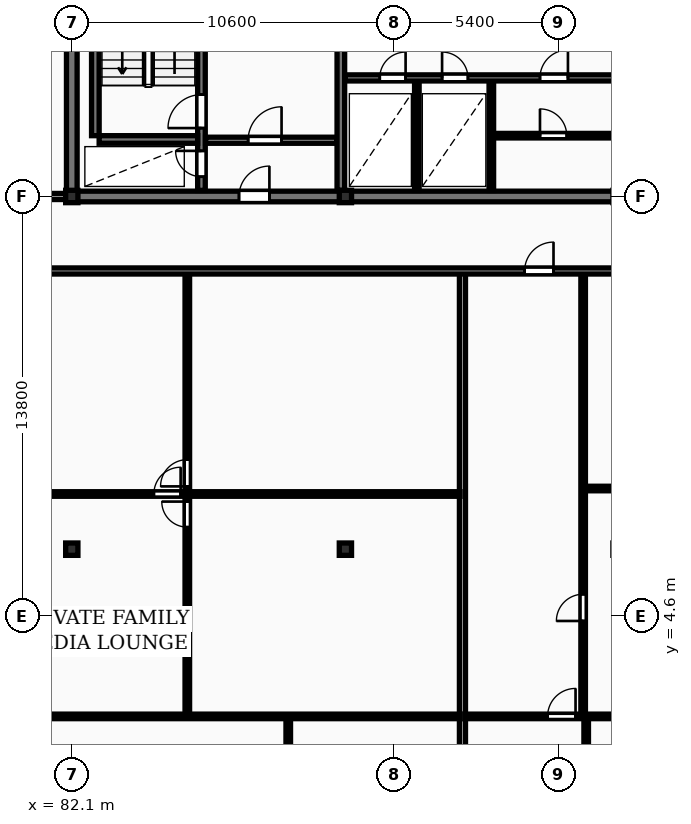
"""IFC4 building model, lengths in metres.
Left out: names, types, materials, properties, quantities, classifications, styles, units other than length and angle.
Written with IfcOpenShell. Run it as: python <this file> out.ifc"""

import sys

from ifc_helpers import new_model, si_unit, direction, frame, frame_2d, origin, origin_2d, place, context, subcontext, project, spatial, rectangle, i_section, extrude, element, fill, save


model = new_model("IFC4")
c1 = context("Model", 3, precision=1e-05, world=origin(), true_north=direction((0.0, 1.0)))
c2 = subcontext(c1, "Body", "Model", "MODEL_VIEW")
j1 = project(units=[si_unit("LENGTHUNIT", "METRE"), si_unit("PLANEANGLEUNIT", "RADIAN")], contexts=[c1])
p1 = place(None, origin())
s1 = spatial("IfcSite", under=j1, at=p1, CompositionType="ELEMENT")
p2 = place(p1, origin())
s2 = spatial("IfcBuilding", under=s1, at=p2, CompositionType="ELEMENT")
p3 = place(p2, frame((0.0, 0.0, 139.3)))
s3 = spatial("IfcBuildingStorey", under=s2, at=p3, CompositionType="ELEMENT", Elevation=139.3)
for number, where, z_axis, x_axis in (
    (1, (82.1, 6.8, 0.0), (0.0, 0.0, 1.0), (1.0, 0.0, 0.0)),
    (2, (82.1, 18.4, 0.0), (0.0, 0.0, 1.0), (1.0, 0.0, 0.0)),
    (3, (91.1, 6.8, 0.0), (0.0, 0.0, 1.0), (1.0, 0.0, 0.0)),
    (4, (91.1, 18.4, 0.0), (0.0, 0.0, 1.0), (1.0, 0.0, 0.0)),
):
    element("IfcColumn", number, at=place(p3, frame(where, z_axis=z_axis, x_axis=x_axis)), inside=s3, PredefinedType="COLUMN", context=c2, shape_type="SweptSolid", body=[
        extrude(i_section(OverallWidth=0.403, OverallDepth=0.406, WebThickness=0.027, FlangeThickness=0.043, FilletRadius=0.015, at=origin_2d()), origin(), (0.0, 0.0, 1.0), 3.6),
    ])
p4 = place(p3, frame((82.1, 18.575, 0.0), z_axis=(0.0, 0.0, 1.0), x_axis=(0.0, 1.0, 0.0)))
e5 = element("IfcWall", 5, at=p4, inside=s3, PredefinedType="SHEAR", context=c2, shape_type="SweptSolid", body=[
    extrude(rectangle(XDim=11.65, YDim=0.35, at=frame_2d((5.825, 0.0))), origin(), (0.0, 0.0, 1.0), 3.6),
])
p5 = place(p3, frame((81.925, 18.4, 0.0), z_axis=(0.0, 0.0, 1.0), x_axis=(1.0, 0.0, 0.0)))
e6 = element("IfcWall", 6, at=p5, inside=s3, PredefinedType="SHEAR", context=c2, shape_type="SweptSolid", body=[
    extrude(rectangle(XDim=36.265, YDim=0.35, at=frame_2d((18.132, 0.0))), origin(), (0.0, 0.0, 1.0), 3.6),
])
p6 = place(p5, frame((5.675, 0.0, 0.0)))
e7 = element("IfcOpeningElement", 7, at=p6, cuts=e6, PredefinedType="OPENING", context=c2, shape_type="SweptSolid", body=[
    extrude(rectangle(XDim=1.0, YDim=2.15, at=frame_2d((0.5, 1.075))), frame((0.0, 0.185, 0.0), z_axis=(0.0, -1.0, 0.0), x_axis=(1.0, 0.0, 0.0)), (0.0, 0.0, 1.0), 0.37),
])
p7 = place(p5, frame((21.925, 0.0, 0.0)))
e8 = element("IfcOpeningElement", 8, at=p7, cuts=e6, PredefinedType="OPENING", context=c2, shape_type="SweptSolid", body=[
    extrude(rectangle(XDim=1.5, YDim=2.2, at=frame_2d((0.75, 1.1))), frame((0.0, 0.185, 0.0), z_axis=(0.0, -1.0, 0.0), x_axis=(1.0, 0.0, 0.0)), (0.0, 0.0, 1.0), 0.37),
])
p8 = place(p5, frame((29.875, 0.0, 0.0)))
e9 = element("IfcOpeningElement", 9, at=p8, cuts=e6, PredefinedType="OPENING", context=c2, shape_type="SweptSolid", body=[
    extrude(rectangle(XDim=1.0, YDim=2.15, at=frame_2d((0.5, 1.075))), frame((0.0, 0.185, 0.0), z_axis=(0.0, -1.0, 0.0), x_axis=(1.0, 0.0, 0.0)), (0.0, 0.0, 1.0), 0.37),
])
p9 = place(p3, frame((82.875, 20.4, 0.0), z_axis=(0.0, 0.0, 1.0), x_axis=(0.0, 1.0, 0.0)))
e10 = element("IfcWall", 10, at=p9, inside=s3, PredefinedType="SHEAR", context=c2, shape_type="SweptSolid", body=[
    extrude(rectangle(XDim=7.6, YDim=0.25, at=frame_2d((3.8, 0.0))), origin(), (0.0, 0.0, 1.0), 3.6),
])
p10 = place(p3, frame((86.365, 18.6, 0.0), z_axis=(0.0, 0.0, 1.0), x_axis=(0.0, 1.0, 0.0)))
e11 = element("IfcWall", 11, at=p10, inside=s3, PredefinedType="SHEAR", context=c2, shape_type="SweptSolid", body=[
    extrude(rectangle(XDim=11.6, YDim=0.25, at=frame_2d((5.8, 0.0))), origin(), (0.0, 0.0, 1.0), 3.6),
])
p11 = place(p10, frame((0.45, 0.0, 0.0)))
e12 = element("IfcOpeningElement", 12, at=p11, cuts=e11, PredefinedType="OPENING", context=c2, shape_type="SweptSolid", body=[
    extrude(rectangle(XDim=0.85, YDim=2.05, at=frame_2d((0.425, 1.025))), frame((0.0, 0.135, 0.0), z_axis=(0.0, -1.0, 0.0), x_axis=(1.0, 0.0, 0.0)), (0.0, 0.0, 1.0), 0.27),
])
p12 = place(p10, frame((2.05, 0.0, 0.0)))
e13 = element("IfcOpeningElement", 13, at=p12, cuts=e11, PredefinedType="OPENING", context=c2, shape_type="SweptSolid", body=[
    extrude(rectangle(XDim=1.1, YDim=2.1, at=frame_2d((0.55, 1.05))), frame((0.0, 0.135, 0.0), z_axis=(0.0, -1.0, 0.0), x_axis=(1.0, 0.0, 0.0)), (0.0, 0.0, 1.0), 0.27),
])
p13 = place(p10, frame((9.95, 0.0, 0.0)))
e14 = element("IfcOpeningElement", 14, at=p13, cuts=e11, PredefinedType="OPENING", context=c2, shape_type="SweptSolid", body=[
    extrude(rectangle(XDim=0.85, YDim=2.05, at=frame_2d((0.425, 1.025))), frame((0.0, 0.135, 0.0), z_axis=(0.0, -1.0, 0.0), x_axis=(1.0, 0.0, 0.0)), (0.0, 0.0, 1.0), 0.27),
])
p14 = place(p3, frame((83.0, 20.275, 0.0), z_axis=(0.0, 0.0, 1.0), x_axis=(1.0, 0.0, 0.0)))
e15 = element("IfcWall", 15, at=p14, inside=s3, PredefinedType="SHEAR", context=c2, shape_type="SweptSolid", body=[
    extrude(rectangle(XDim=3.24, YDim=0.25, at=frame_2d((1.62, 0.0))), origin(), (0.0, 0.0, 1.0), 3.6),
])
p15 = place(p3, frame((86.5, 20.25, 0.0), z_axis=(0.0, 0.0, 1.0), x_axis=(1.0, 0.0, 0.0)))
e16 = element("IfcWall", 16, at=p15, inside=s3, PredefinedType="PARTITIONING", context=c2, shape_type="SweptSolid", body=[
    extrude(rectangle(XDim=4.32, YDim=0.2, at=frame_2d((2.16, 0.0))), origin(), (0.0, 0.0, 1.0), 3.31),
])
p16 = place(p15, frame((1.4, 0.0, 0.0)))
e17 = element("IfcOpeningElement", 17, at=p16, cuts=e16, PredefinedType="OPENING", context=c2, shape_type="SweptSolid", body=[
    extrude(rectangle(XDim=1.1, YDim=2.1, at=frame_2d((0.55, 1.05))), frame((0.0, 0.11, 0.0), z_axis=(0.0, -1.0, 0.0), x_axis=(1.0, 0.0, 0.0)), (0.0, 0.0, 1.0), 0.22),
])
p17 = place(p3, frame((90.95, 18.6, 0.0), z_axis=(0.0, 0.0, 1.0), x_axis=(0.0, 1.0, 0.0)))
e18 = element("IfcWall", 18, at=p17, inside=s3, PredefinedType="SHEAR", context=c2, shape_type="SweptSolid", body=[
    extrude(rectangle(XDim=11.6, YDim=0.25, at=frame_2d((5.8, 0.0))), origin(), (0.0, 0.0, 1.0), 3.6),
])
p18 = place(p17, frame((4.6, 0.0, 0.0)))
e19 = element("IfcOpeningElement", 19, at=p18, cuts=e18, PredefinedType="OPENING", context=c2, shape_type="SweptSolid", body=[
    extrude(rectangle(XDim=1.1, YDim=2.1, at=frame_2d((0.55, 1.05))), frame((0.0, 0.135, 0.0), z_axis=(0.0, -1.0, 0.0), x_axis=(1.0, 0.0, 0.0)), (0.0, 0.0, 1.0), 0.27),
])
for number, where, z_axis, x_axis in (
    (20, (93.45, 18.6, 0.0), (0.0, 0.0, 1.0), (0.0, 1.0, 0.0)),
    (21, (95.9, 18.6, 0.0), (0.0, 0.0, 1.0), (0.0, 1.0, 0.0)),
):
    element("IfcWall", number, at=place(p3, frame(where, z_axis=z_axis, x_axis=x_axis)), inside=s3, PredefinedType="PARTITIONING", context=c2, shape_type="SweptSolid", body=[
        extrude(rectangle(XDim=3.6, YDim=0.15, at=frame_2d((1.8, 0.0))), origin(), (0.0, 0.0, 1.0), 3.31),
    ])
p19 = place(p3, frame((95.9, 20.4, 0.0), z_axis=(0.0, 0.0, 1.0), x_axis=(1.0, 0.0, 0.0)))
e22 = element("IfcWall", 22, at=p19, inside=s3, PredefinedType="PARTITIONING", context=c2, shape_type="SweptSolid", body=[
    extrude(rectangle(XDim=6.7, YDim=0.15, at=frame_2d((3.35, 0.0))), origin(), (0.0, 0.0, 1.0), 3.31),
])
p20 = place(p19, frame((1.6, 0.0, 0.0)))
e23 = element("IfcOpeningElement", 23, at=p20, cuts=e22, PredefinedType="OPENING", context=c2, shape_type="SweptSolid", body=[
    extrude(rectangle(XDim=0.88, YDim=2.06, at=frame_2d((0.44, 1.03))), frame((0.0, 0.085, 0.0), z_axis=(0.0, -1.0, 0.0), x_axis=(1.0, 0.0, 0.0)), (0.0, 0.0, 1.0), 0.17),
])
p21 = place(p3, frame((91.08, 22.3, 0.0), z_axis=(0.0, 0.0, 1.0), x_axis=(1.0, 0.0, 0.0)))
e24 = element("IfcWall", 24, at=p21, inside=s3, PredefinedType="PARTITIONING", context=c2, shape_type="SweptSolid", body=[
    extrude(rectangle(XDim=19.14, YDim=0.2, at=frame_2d((9.57, 0.0))), origin(), (0.0, 0.0, 1.0), 3.31),
])
p22 = place(p21, frame((1.15, 0.0, 0.0)))
e25 = element("IfcOpeningElement", 25, at=p22, cuts=e24, PredefinedType="OPENING", context=c2, shape_type="SweptSolid", body=[
    extrude(rectangle(XDim=0.85, YDim=2.05, at=frame_2d((0.425, 1.025))), frame((0.0, 0.11, 0.0), z_axis=(0.0, -1.0, 0.0), x_axis=(1.0, 0.0, 0.0)), (0.0, 0.0, 1.0), 0.22),
])
p23 = place(p21, frame((3.2, 0.0, 0.0)))
e26 = element("IfcOpeningElement", 26, at=p23, cuts=e24, PredefinedType="OPENING", context=c2, shape_type="SweptSolid", body=[
    extrude(rectangle(XDim=0.85, YDim=2.05, at=frame_2d((0.425, 1.025))), frame((0.0, 0.11, 0.0), z_axis=(0.0, -1.0, 0.0), x_axis=(1.0, 0.0, 0.0)), (0.0, 0.0, 1.0), 0.22),
])
p24 = place(p21, frame((12.72, 0.0, 0.0)))
e27 = element("IfcOpeningElement", 27, at=p24, cuts=e24, PredefinedType="OPENING", context=c2, shape_type="SweptSolid", body=[
    extrude(rectangle(XDim=1.5, YDim=2.2, at=frame_2d((0.75, 1.1))), frame((0.0, 0.11, 0.0), z_axis=(0.0, -1.0, 0.0), x_axis=(1.0, 0.0, 0.0)), (0.0, 0.0, 1.0), 0.22),
])
p25 = place(p21, frame((6.42, 0.0, 0.0)))
e28 = element("IfcOpeningElement", 28, at=p25, cuts=e24, PredefinedType="OPENING", context=c2, shape_type="SweptSolid", body=[
    extrude(rectangle(XDim=0.92, YDim=2.08, at=frame_2d((0.46, 1.04))), frame((0.0, 0.11, 0.0), z_axis=(0.0, -1.0, 0.0), x_axis=(1.0, 0.0, 0.0)), (0.0, 0.0, 1.0), 0.22),
])
p26 = place(p21, frame((15.92, 0.0, 0.0)))
e29 = element("IfcOpeningElement", 29, at=p26, cuts=e24, PredefinedType="OPENING", context=c2, shape_type="SweptSolid", body=[
    extrude(rectangle(XDim=0.88, YDim=2.06, at=frame_2d((0.44, 1.03))), frame((0.0, 0.11, 0.0), z_axis=(0.0, -1.0, 0.0), x_axis=(1.0, 0.0, 0.0)), (0.0, 0.0, 1.0), 0.22),
])
p27 = place(p3, frame((72.7, 18.4, 0.0), z_axis=(0.0, 0.0, 1.0), x_axis=(1.0, 0.0, 0.0)))
e30 = element("IfcWall", 30, at=p27, inside=s3, PredefinedType="PARTITIONING", context=c2, shape_type="SweptSolid", body=[
    extrude(rectangle(XDim=9.25, YDim=0.2, at=frame_2d((4.625, 0.0))), origin(), (0.0, 0.0, 1.0), 2.698),
])
p28 = place(p27, frame((4.15, 0.0, 0.0)))
e31 = element("IfcOpeningElement", 31, at=p28, cuts=e30, PredefinedType="OPENING", context=c2, shape_type="SweptSolid", body=[
    extrude(rectangle(XDim=0.95, YDim=2.15, at=frame_2d((0.475, 1.075))), frame((0.0, 0.11, 0.0), z_axis=(0.0, -1.0, 0.0), x_axis=(1.0, 0.0, 0.0)), (0.0, 0.0, 1.0), 0.22),
])
p29 = place(p3, frame((94.95, -8.7, 0.0), z_axis=(0.0, 0.0, 1.0), x_axis=(0.0, 1.0, 0.0)))
e32 = element("IfcWall", 32, at=p29, inside=s3, PredefinedType="PARTITIONING", context=c2, shape_type="SweptSolid", body=[
    extrude(rectangle(XDim=24.57, YDim=0.2, at=frame_2d((12.285, 0.0))), origin(), (0.0, 0.0, 1.0), 3.31),
])
p30 = place(p3, frame((85.9, 1.34, 0.0), z_axis=(0.0, 0.0, 1.0), x_axis=(0.0, 1.0, 0.0)))
e33 = element("IfcWall", 33, at=p30, inside=s3, PredefinedType="PARTITIONING", context=c2, shape_type="SweptSolid", body=[
    extrude(rectangle(XDim=14.55, YDim=0.15, at=frame_2d((7.275, 0.0))), origin(), (0.0, 0.0, 1.0), 3.31),
])
p31 = place(p30, frame((6.185, 0.0, 0.0)))
e34 = element("IfcOpeningElement", 34, at=p31, cuts=e33, PredefinedType="OPENING", context=c2, shape_type="SweptSolid", body=[
    extrude(rectangle(XDim=0.84, YDim=2.04, at=frame_2d((0.42, 1.02))), frame((0.0, 0.085, 0.0), z_axis=(0.0, -1.0, 0.0), x_axis=(1.0, 0.0, 0.0)), (0.0, 0.0, 1.0), 0.17),
])
p32 = place(p30, frame((7.525, 0.0, 0.0)))
e35 = element("IfcOpeningElement", 35, at=p32, cuts=e33, PredefinedType="OPENING", context=c2, shape_type="SweptSolid", body=[
    extrude(rectangle(XDim=0.88, YDim=2.06, at=frame_2d((0.44, 1.03))), frame((0.0, 0.085, 0.0), z_axis=(0.0, -1.0, 0.0), x_axis=(1.0, 0.0, 0.0)), (0.0, 0.0, 1.0), 0.17),
])
p33 = place(p3, frame((76.73, 8.615, 0.0), z_axis=(0.0, 0.0, 1.0), x_axis=(1.0, 0.0, 0.0)))
e36 = element("IfcWall", 36, at=p33, inside=s3, PredefinedType="PARTITIONING", context=c2, shape_type="SweptSolid", body=[
    extrude(rectangle(XDim=18.14, YDim=0.15, at=frame_2d((9.07, 0.0))), origin(), (0.0, 0.0, 1.0), 3.31),
])
p34 = place(p33, frame((8.07, 0.0, 0.0)))
e37 = element("IfcOpeningElement", 37, at=p34, cuts=e36, PredefinedType="OPENING", context=c2, shape_type="SweptSolid", body=[
    extrude(rectangle(XDim=0.88, YDim=2.06, at=frame_2d((0.44, 1.03))), frame((0.0, 0.085, 0.0), z_axis=(0.0, -1.0, 0.0), x_axis=(1.0, 0.0, 0.0)), (0.0, 0.0, 1.0), 0.17),
])
p35 = place(p3, frame((89.22, -1.32, 0.0), z_axis=(0.0, 0.0, 1.0), x_axis=(0.0, 1.0, 0.0)))
e38 = element("IfcWall", 38, at=p35, inside=s3, PredefinedType="PARTITIONING", context=c2, shape_type="SweptSolid", body=[
    extrude(rectangle(XDim=2.58, YDim=0.15, at=frame_2d((1.29, 0.0))), origin(), (0.0, 0.0, 1.0), 3.31),
])
p36 = place(p3, frame((72.78, 1.3, 0.0), z_axis=(0.0, 0.0, 1.0), x_axis=(1.0, 0.0, 0.0)))
e39 = element("IfcWall", 39, at=p36, inside=s3, PredefinedType="PARTITIONING", context=c2, shape_type="SweptSolid", body=[
    extrude(rectangle(XDim=22.09, YDim=0.15, at=frame_2d((11.045, 0.0))), origin(), (0.0, 0.0, 1.0), 3.31),
])
p37 = place(p36, frame((2.72, 0.0, 0.0)))
e40 = element("IfcOpeningElement", 40, at=p37, cuts=e39, PredefinedType="OPENING", context=c2, shape_type="SweptSolid", body=[
    extrude(rectangle(XDim=0.92, YDim=2.08, at=frame_2d((0.46, 1.04))), frame((0.0, 0.085, 0.0), z_axis=(0.0, -1.0, 0.0), x_axis=(1.0, 0.0, 0.0)), (0.0, 0.0, 1.0), 0.17),
])
p38 = place(p3, frame((98.98, 8.795, 0.0), z_axis=(0.0, 0.0, 1.0), x_axis=(1.0, 0.0, 0.0)))
e41 = element("IfcWall", 41, at=p38, inside=s3, PredefinedType="PARTITIONING", context=c2, shape_type="SweptSolid", body=[
    extrude(rectangle(XDim=11.348, YDim=0.15, at=frame_2d((5.674, 0.0))), origin(), (0.0, 0.0, 1.0), 3.31),
])
p39 = place(p38, frame((4.372, 0.0, 0.0)))
e42 = element("IfcOpeningElement", 42, at=p39, cuts=e41, PredefinedType="OPENING", context=c2, shape_type="SweptSolid", body=[
    extrude(rectangle(XDim=0.88, YDim=2.06, at=frame_2d((0.44, 1.03))), frame((0.0, 0.085, 0.0), z_axis=(0.0, -1.0, 0.0), x_axis=(1.0, 0.0, 0.0)), (0.0, 0.0, 1.0), 0.17),
])
p40 = place(p3, frame((98.92, 1.34, 0.0), z_axis=(0.0, 0.0, 1.0), x_axis=(0.0, 1.0, 0.0)))
e43 = element("IfcWall", 43, at=p40, inside=s3, PredefinedType="PARTITIONING", context=c2, shape_type="SweptSolid", body=[
    extrude(rectangle(XDim=14.55, YDim=0.15, at=frame_2d((7.275, 0.0))), origin(), (0.0, 0.0, 1.0), 3.31),
])
p41 = place(p40, frame((3.098, 0.0, 0.0)))
e44 = element("IfcOpeningElement", 44, at=p41, cuts=e43, PredefinedType="OPENING", context=c2, shape_type="SweptSolid", body=[
    extrude(rectangle(XDim=0.88, YDim=2.06, at=frame_2d((0.44, 1.03))), frame((0.0, 0.085, 0.0), z_axis=(0.0, -1.0, 0.0), x_axis=(1.0, 0.0, 0.0)), (0.0, 0.0, 1.0), 0.17),
])
p42 = place(p3, frame((99.02, -3.74, 0.0), z_axis=(0.0, 0.0, 1.0), x_axis=(0.0, 1.0, 0.0)))
e45 = element("IfcWall", 45, at=p42, inside=s3, PredefinedType="PARTITIONING", context=c2, shape_type="SweptSolid", body=[
    extrude(rectangle(XDim=5.0, YDim=0.15, at=frame_2d((2.5, 0.0))), origin(), (0.0, 0.0, 1.0), 3.31),
])
p43 = place(p42, frame((2.06, 0.0, 0.0)))
e46 = element("IfcOpeningElement", 46, at=p43, cuts=e45, PredefinedType="OPENING", context=c2, shape_type="SweptSolid", body=[
    extrude(rectangle(XDim=0.88, YDim=2.06, at=frame_2d((0.44, 1.03))), frame((0.0, 0.085, 0.0), z_axis=(0.0, -1.0, 0.0), x_axis=(1.0, 0.0, 0.0)), (0.0, 0.0, 1.0), 0.17),
])
p44 = place(p3, frame((95.03, 1.3, 0.0), z_axis=(0.0, 0.0, 1.0), x_axis=(1.0, 0.0, 0.0)))
e47 = element("IfcWall", 47, at=p44, inside=s3, PredefinedType="PARTITIONING", context=c2, shape_type="SweptSolid", body=[
    extrude(rectangle(XDim=15.298, YDim=0.15, at=frame_2d((7.649, 0.0))), origin(), (0.0, 0.0, 1.0), 3.31),
])
p45 = place(p44, frame((2.72, 0.0, 0.0)))
e48 = element("IfcOpeningElement", 48, at=p45, cuts=e47, PredefinedType="OPENING", context=c2, shape_type="SweptSolid", body=[
    extrude(rectangle(XDim=0.92, YDim=2.08, at=frame_2d((0.46, 1.04))), frame((0.0, 0.085, 0.0), z_axis=(0.0, -1.0, 0.0), x_axis=(1.0, 0.0, 0.0)), (0.0, 0.0, 1.0), 0.17),
])
p46 = place(p3, frame((72.7, 15.95, 0.0), z_axis=(0.0, 0.0, 1.0), x_axis=(1.0, 0.0, 0.0)))
e49 = element("IfcWall", 49, at=p46, inside=s3, PredefinedType="PARTITIONING", context=c2, shape_type="SweptSolid", body=[
    extrude(rectangle(XDim=58.0, YDim=0.2, at=frame_2d((29.0, 0.0))), origin(), (0.0, 0.0, 1.0), 3.31),
])
p47 = place(p46, frame((2.045, 0.0, 0.0)))
e50 = element("IfcOpeningElement", 50, at=p47, cuts=e49, PredefinedType="OPENING", context=c2, shape_type="SweptSolid", body=[
    extrude(rectangle(XDim=0.95, YDim=2.15, at=frame_2d((0.475, 1.075))), frame((0.0, 0.11, 0.0), z_axis=(0.0, -1.0, 0.0), x_axis=(1.0, 0.0, 0.0)), (0.0, 0.0, 1.0), 0.22),
])
p48 = place(p46, frame((24.295, 0.0, 0.0)))
e51 = element("IfcOpeningElement", 51, at=p48, cuts=e49, PredefinedType="OPENING", context=c2, shape_type="SweptSolid", body=[
    extrude(rectangle(XDim=0.95, YDim=2.15, at=frame_2d((0.475, 1.075))), frame((0.0, 0.11, 0.0), z_axis=(0.0, -1.0, 0.0), x_axis=(1.0, 0.0, 0.0)), (0.0, 0.0, 1.0), 0.22),
])
p49 = place(p46, frame((39.753, 0.0, 0.0)))
e52 = element("IfcOpeningElement", 52, at=p49, cuts=e49, PredefinedType="OPENING", context=c2, shape_type="SweptSolid", body=[
    extrude(rectangle(XDim=0.95, YDim=2.15, at=frame_2d((0.475, 1.075))), frame((0.0, 0.11, 0.0), z_axis=(0.0, -1.0, 0.0), x_axis=(1.0, 0.0, 0.0)), (0.0, 0.0, 1.0), 0.22),
])
p50 = place(p6, origin())
e53 = element("IfcDoor", 53, at=p50, inside=s3, OperationType="SINGLE_SWING_RIGHT", PredefinedType="DOOR", context=c2, shape_type="SweptSolid", body=[
    extrude(rectangle(XDim=1.0, YDim=2.15, at=frame_2d((0.5, 1.075))), frame((0.0, 0.025, 0.0), z_axis=(0.0, -1.0, 0.0), x_axis=(1.0, 0.0, 0.0)), (0.0, 0.0, 1.0), 0.05),
])
fill(e7, e53)
p51 = place(p11, origin())
e54 = element("IfcDoor", 54, at=p51, inside=s3, OperationType="SINGLE_SWING_RIGHT", PredefinedType="DOOR", context=c2, shape_type="SweptSolid", body=[
    extrude(rectangle(XDim=0.85, YDim=2.05, at=frame_2d((0.425, 1.025))), frame((0.0, 0.025, 0.0), z_axis=(0.0, -1.0, 0.0), x_axis=(1.0, 0.0, 0.0)), (0.0, 0.0, 1.0), 0.05),
])
fill(e12, e54)
p52 = place(p12, origin())
e55 = element("IfcDoor", 55, at=p52, inside=s3, OperationType="SINGLE_SWING_LEFT", PredefinedType="DOOR", context=c2, shape_type="SweptSolid", body=[
    extrude(rectangle(XDim=1.1, YDim=2.1, at=frame_2d((0.55, 1.05))), frame((0.0, 0.025, 0.0), z_axis=(0.0, -1.0, 0.0), x_axis=(1.0, 0.0, 0.0)), (0.0, 0.0, 1.0), 0.05),
])
fill(e13, e55)
p53 = place(p16, origin())
e56 = element("IfcDoor", 56, at=p53, inside=s3, OperationType="SINGLE_SWING_RIGHT", PredefinedType="DOOR", context=c2, shape_type="SweptSolid", body=[
    extrude(rectangle(XDim=1.1, YDim=2.1, at=frame_2d((0.55, 1.05))), frame((0.0, 0.025, 0.0), z_axis=(0.0, -1.0, 0.0), x_axis=(1.0, 0.0, 0.0)), (0.0, 0.0, 1.0), 0.05),
])
fill(e17, e56)
p54 = place(p20, origin())
e57 = element("IfcDoor", 57, at=p54, inside=s3, OperationType="SINGLE_SWING_LEFT", PredefinedType="DOOR", context=c2, shape_type="SweptSolid", body=[
    extrude(rectangle(XDim=0.88, YDim=2.06, at=frame_2d((0.44, 1.03))), frame((0.0, 0.025, 0.0), z_axis=(0.0, -1.0, 0.0), x_axis=(1.0, 0.0, 0.0)), (0.0, 0.0, 1.0), 0.05),
])
fill(e23, e57)
p55 = place(p22, origin())
e58 = element("IfcDoor", 58, at=p55, inside=s3, OperationType="SINGLE_SWING_RIGHT", PredefinedType="DOOR", context=c2, shape_type="SweptSolid", body=[
    extrude(rectangle(XDim=0.85, YDim=2.05, at=frame_2d((0.425, 1.025))), frame((0.0, 0.025, 0.0), z_axis=(0.0, -1.0, 0.0), x_axis=(1.0, 0.0, 0.0)), (0.0, 0.0, 1.0), 0.05),
])
fill(e25, e58)
p56 = place(p23, origin())
e59 = element("IfcDoor", 59, at=p56, inside=s3, OperationType="SINGLE_SWING_LEFT", PredefinedType="DOOR", context=c2, shape_type="SweptSolid", body=[
    extrude(rectangle(XDim=0.85, YDim=2.05, at=frame_2d((0.425, 1.025))), frame((0.0, 0.025, 0.0), z_axis=(0.0, -1.0, 0.0), x_axis=(1.0, 0.0, 0.0)), (0.0, 0.0, 1.0), 0.05),
])
fill(e26, e59)
p57 = place(p25, origin())
e60 = element("IfcDoor", 60, at=p57, inside=s3, OperationType="SINGLE_SWING_RIGHT", PredefinedType="DOOR", context=c2, shape_type="SweptSolid", body=[
    extrude(rectangle(XDim=0.92, YDim=2.08, at=frame_2d((0.46, 1.04))), frame((0.0, 0.025, 0.0), z_axis=(0.0, -1.0, 0.0), x_axis=(1.0, 0.0, 0.0)), (0.0, 0.0, 1.0), 0.05),
])
fill(e28, e60)
p58 = place(p31, origin())
e61 = element("IfcDoor", 61, at=p58, inside=s3, OperationType="SINGLE_SWING_RIGHT", PredefinedType="DOOR", context=c2, shape_type="SweptSolid", body=[
    extrude(rectangle(XDim=0.84, YDim=2.04, at=frame_2d((0.42, 1.02))), frame((0.0, 0.025, 0.0), z_axis=(0.0, -1.0, 0.0), x_axis=(1.0, 0.0, 0.0)), (0.0, 0.0, 1.0), 0.05),
])
fill(e34, e61)
p59 = place(p32, origin())
e62 = element("IfcDoor", 62, at=p59, inside=s3, OperationType="SINGLE_SWING_LEFT", PredefinedType="DOOR", context=c2, shape_type="SweptSolid", body=[
    extrude(rectangle(XDim=0.88, YDim=2.06, at=frame_2d((0.44, 1.03))), frame((0.0, 0.025, 0.0), z_axis=(0.0, -1.0, 0.0), x_axis=(1.0, 0.0, 0.0)), (0.0, 0.0, 1.0), 0.05),
])
fill(e35, e62)
p60 = place(p34, origin())
e63 = element("IfcDoor", 63, at=p60, inside=s3, OperationType="SINGLE_SWING_RIGHT", PredefinedType="DOOR", context=c2, shape_type="SweptSolid", body=[
    extrude(rectangle(XDim=0.88, YDim=2.06, at=frame_2d((0.44, 1.03))), frame((0.0, 0.025, 0.0), z_axis=(0.0, -1.0, 0.0), x_axis=(1.0, 0.0, 0.0)), (0.0, 0.0, 1.0), 0.05),
])
fill(e37, e63)
p61 = place(p41, origin())
e64 = element("IfcDoor", 64, at=p61, inside=s3, OperationType="SINGLE_SWING_LEFT", PredefinedType="DOOR", context=c2, shape_type="SweptSolid", body=[
    extrude(rectangle(XDim=0.88, YDim=2.06, at=frame_2d((0.44, 1.03))), frame((0.0, 0.025, 0.0), z_axis=(0.0, -1.0, 0.0), x_axis=(1.0, 0.0, 0.0)), (0.0, 0.0, 1.0), 0.05),
])
fill(e44, e64)
p62 = place(p45, origin())
e65 = element("IfcDoor", 65, at=p62, inside=s3, OperationType="SINGLE_SWING_RIGHT", PredefinedType="DOOR", context=c2, shape_type="SweptSolid", body=[
    extrude(rectangle(XDim=0.92, YDim=2.08, at=frame_2d((0.46, 1.04))), frame((0.0, 0.025, 0.0), z_axis=(0.0, -1.0, 0.0), x_axis=(1.0, 0.0, 0.0)), (0.0, 0.0, 1.0), 0.05),
])
fill(e48, e65)
p63 = place(p48, origin())
e66 = element("IfcDoor", 66, at=p63, inside=s3, OperationType="SINGLE_SWING_RIGHT", PredefinedType="DOOR", context=c2, shape_type="SweptSolid", body=[
    extrude(rectangle(XDim=0.95, YDim=2.15, at=frame_2d((0.475, 1.075))), frame((0.0, 0.025, 0.0), z_axis=(0.0, -1.0, 0.0), x_axis=(1.0, 0.0, 0.0)), (0.0, 0.0, 1.0), 0.05),
])
fill(e51, e66)
save(model, sys.argv[1])
